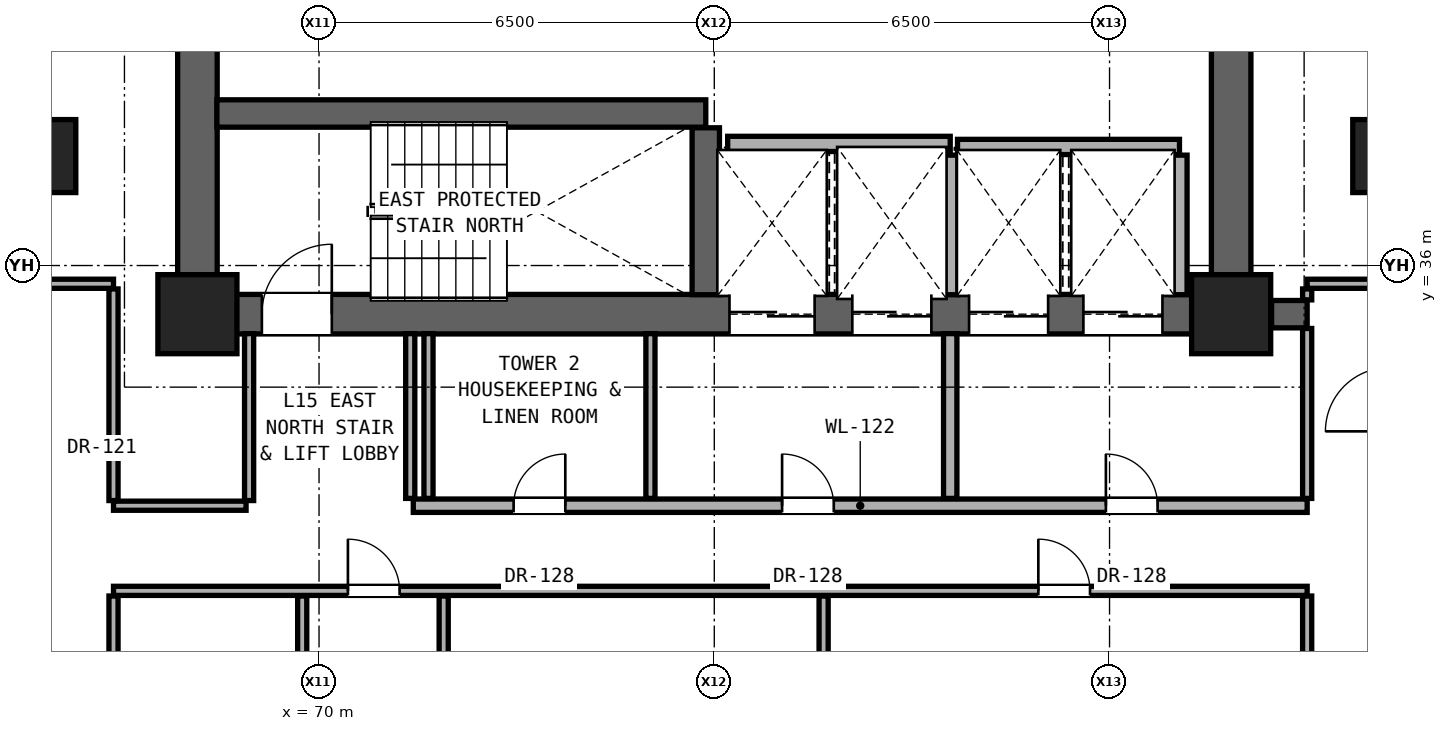
"""IFC4 building model, lengths in metres.
Left out: names, types, materials, properties, quantities, classifications, styles, units other than length and angle.
Written with IfcOpenShell. Run it as: python <this file> out.ifc"""

import sys

from ifc_helpers import new_model, si_unit, direction, frame, frame_2d, origin, origin_2d, place, context, subcontext, project, spatial, rectangle, extrude, element, fill, save


model = new_model("IFC4")
c1 = context("Model", 3, precision=1e-05, world=origin(), true_north=direction((0.0, 1.0)))
c2 = subcontext(c1, "Body", "Model", "MODEL_VIEW")
j1 = project(units=[si_unit("LENGTHUNIT", "METRE"), si_unit("PLANEANGLEUNIT", "RADIAN")], contexts=[c1])
p1 = place(None, origin())
s1 = spatial("IfcSite", under=j1, at=p1, CompositionType="ELEMENT")
p2 = place(p1, origin())
s2 = spatial("IfcBuilding", under=s1, at=p2, CompositionType="ELEMENT")
p3 = place(p2, frame((0.0, 0.0, 55.4)))
s3 = spatial("IfcBuildingStorey", under=s2, at=p3, CompositionType="ELEMENT", Elevation=55.4)
for number, where, z_axis, x_axis in (
    (1, (68.0, 35.2, 0.0), (0.0, 0.0, 1.0), (1.0, 0.0, 0.0)),
    (2, (85.0, 35.2, 0.0), (0.0, 0.0, 1.0), (1.0, 0.0, 0.0)),
):
    element("IfcColumn", number, at=place(p3, frame(where, z_axis=z_axis, x_axis=x_axis)), inside=s3, PredefinedType="COLUMN", context=c2, shape_type="SweptSolid", body=[
        extrude(rectangle(XDim=1.3, YDim=1.3, at=origin_2d()), origin(), (0.0, 0.0, 1.0), 3.3),
    ])
for number, where, z_axis, x_axis in (
    (3, (65.6, 37.8, 0.0), (0.0, 0.0, 1.0), (1.0, 0.0, 0.0)),
    (4, (87.4, 37.8, 0.0), (0.0, 0.0, 1.0), (1.0, 0.0, 0.0)),
):
    element("IfcColumn", number, at=place(p3, frame(where, z_axis=z_axis, x_axis=x_axis)), inside=s3, PredefinedType="PILASTER", context=c2, shape_type="SweptSolid", body=[
        extrude(rectangle(XDim=0.8, YDim=1.2, at=origin_2d()), origin(), (0.0, 0.0, 1.0), 3.3),
    ])
for number, where, z_axis, x_axis in (
    (5, (68.0, 35.2, 0.0), (0.0, 0.0, 1.0), (0.0, 1.0, 0.0)),
    (6, (85.0, 35.2, 0.0), (0.0, 0.0, 1.0), (0.0, 1.0, 0.0)),
):
    element("IfcWall", number, at=place(p3, frame(where, z_axis=z_axis, x_axis=x_axis)), inside=s3, PredefinedType="SHEAR", context=c2, shape_type="SweptSolid", body=[
        extrude(rectangle(XDim=5.6, YDim=0.65, at=frame_2d((2.8, 0.0))), origin(), (0.0, 0.0, 1.0), 3.06),
    ])
p4 = place(p3, frame((68.0, 35.2, 0.0), z_axis=(0.0, 0.0, 1.0), x_axis=(1.0, 0.0, 0.0)))
e7 = element("IfcWall", 7, at=p4, inside=s3, PredefinedType="SHEAR", context=c2, shape_type="SweptSolid", body=[
    extrude(rectangle(XDim=17.0, YDim=0.65, at=frame_2d((8.5, 0.0))), origin(), (0.0, 0.0, 1.0), 3.06),
])
p5 = place(p4, frame((1.06, 0.0, 0.0)))
e8 = element("IfcOpeningElement", 8, at=p5, cuts=e7, PredefinedType="OPENING", context=c2, shape_type="SweptSolid", body=[
    extrude(rectangle(XDim=1.15, YDim=2.2, at=frame_2d((0.575, 1.1))), frame((0.0, 0.335, 0.0), z_axis=(0.0, -1.0, 0.0), x_axis=(1.0, 0.0, 0.0)), (0.0, 0.0, 1.0), 0.67),
])
p6 = place(p4, frame((8.75, 0.0, 0.0)))
e9 = element("IfcOpeningElement", 9, at=p6, cuts=e7, PredefinedType="OPENING", context=c2, shape_type="SweptSolid", body=[
    extrude(rectangle(XDim=1.4, YDim=2.35, at=frame_2d((0.7, 1.175))), frame((0.0, 0.335, 0.0), z_axis=(0.0, -1.0, 0.0), x_axis=(1.0, 0.0, 0.0)), (0.0, 0.0, 1.0), 0.67),
])
p7 = place(p4, frame((10.77, 0.0, 0.0)))
e10 = element("IfcOpeningElement", 10, at=p7, cuts=e7, PredefinedType="OPENING", context=c2, shape_type="SweptSolid", body=[
    extrude(rectangle(XDim=1.3, YDim=2.3, at=frame_2d((0.65, 1.15))), frame((0.0, 0.335, 0.0), z_axis=(0.0, -1.0, 0.0), x_axis=(1.0, 0.0, 0.0)), (0.0, 0.0, 1.0), 0.67),
])
p8 = place(p4, frame((12.69, 0.0, 0.0)))
e11 = element("IfcOpeningElement", 11, at=p8, cuts=e7, PredefinedType="OPENING", context=c2, shape_type="SweptSolid", body=[
    extrude(rectangle(XDim=1.3, YDim=2.3, at=frame_2d((0.65, 1.15))), frame((0.0, 0.335, 0.0), z_axis=(0.0, -1.0, 0.0), x_axis=(1.0, 0.0, 0.0)), (0.0, 0.0, 1.0), 0.67),
])
p9 = place(p4, frame((14.57, 0.0, 0.0)))
e12 = element("IfcOpeningElement", 12, at=p9, cuts=e7, PredefinedType="OPENING", context=c2, shape_type="SweptSolid", body=[
    extrude(rectangle(XDim=1.3, YDim=2.3, at=frame_2d((0.65, 1.15))), frame((0.0, 0.335, 0.0), z_axis=(0.0, -1.0, 0.0), x_axis=(1.0, 0.0, 0.0)), (0.0, 0.0, 1.0), 0.67),
])
p10 = place(p3, frame((66.62, 30.65, 0.0), z_axis=(0.0, 0.0, 1.0), x_axis=(1.0, 0.0, 0.0)))
e13 = element("IfcWall", 13, at=p10, inside=s3, PredefinedType="PARTITIONING", context=c2, shape_type="SweptSolid", body=[
    extrude(rectangle(XDim=19.63, YDim=0.15, at=frame_2d((9.815, 0.0))), origin(), (0.0, 0.0, 1.0), 2.125),
])
p11 = place(p10, frame((3.855, 0.0, 0.0)))
e14 = element("IfcOpeningElement", 14, at=p11, cuts=e13, PredefinedType="OPENING", context=c2, shape_type="SweptSolid", body=[
    extrude(rectangle(XDim=0.85, YDim=2.01, at=frame_2d((0.425, 1.005))), frame((0.0, 0.085, 0.0), z_axis=(0.0, -1.0, 0.0), x_axis=(1.0, 0.0, 0.0)), (0.0, 0.0, 1.0), 0.17),
])
p12 = place(p10, frame((15.209, 0.0, 0.0)))
e15 = element("IfcOpeningElement", 15, at=p12, cuts=e13, PredefinedType="OPENING", context=c2, shape_type="SweptSolid", body=[
    extrude(rectangle(XDim=0.85, YDim=2.01, at=frame_2d((0.425, 1.005))), frame((0.0, 0.085, 0.0), z_axis=(0.0, -1.0, 0.0), x_axis=(1.0, 0.0, 0.0)), (0.0, 0.0, 1.0), 0.17),
])
p13 = place(p3, frame((66.62, 32.05, 0.0), z_axis=(0.0, 0.0, 1.0), x_axis=(1.0, 0.0, 0.0)))
e16 = element("IfcWall", 16, at=p13, inside=s3, PredefinedType="PARTITIONING", context=c2, shape_type="SweptSolid", body=[
    extrude(rectangle(XDim=2.18, YDim=0.15, at=frame_2d((1.09, 0.0))), origin(), (0.0, 0.0, 1.0), 2.125),
])
p14 = place(p3, frame((71.55, 32.05, 0.0), z_axis=(0.0, 0.0, 1.0), x_axis=(1.0, 0.0, 0.0)))
e17 = element("IfcWall", 17, at=p14, inside=s3, PredefinedType="SOLIDWALL", context=c2, shape_type="SweptSolid", body=[
    extrude(rectangle(XDim=14.7, YDim=0.22, at=frame_2d((7.35, 0.0))), origin(), (0.0, 0.0, 1.0), 2.125),
])
p15 = place(p14, frame((11.39, 0.0, 0.0)))
e18 = element("IfcOpeningElement", 18, at=p15, cuts=e17, PredefinedType="OPENING", context=c2, shape_type="SweptSolid", body=[
    extrude(rectangle(XDim=0.85, YDim=2.01, at=frame_2d((0.425, 1.005))), frame((0.0, 0.12, 0.0), z_axis=(0.0, -1.0, 0.0), x_axis=(1.0, 0.0, 0.0)), (0.0, 0.0, 1.0), 0.24),
])
p16 = place(p14, frame((6.065, 0.0, 0.0)))
e19 = element("IfcOpeningElement", 19, at=p16, cuts=e17, PredefinedType="OPENING", context=c2, shape_type="SweptSolid", body=[
    extrude(rectangle(XDim=0.85, YDim=2.01, at=frame_2d((0.425, 1.005))), frame((0.0, 0.12, 0.0), z_axis=(0.0, -1.0, 0.0), x_axis=(1.0, 0.0, 0.0)), (0.0, 0.0, 1.0), 0.24),
])
p17 = place(p14, frame((1.65, 0.0, 0.0)))
e20 = element("IfcOpeningElement", 20, at=p17, cuts=e17, PredefinedType="OPENING", context=c2, shape_type="SweptSolid", body=[
    extrude(rectangle(XDim=0.85, YDim=2.01, at=frame_2d((0.425, 1.005))), frame((0.0, 0.12, 0.0), z_axis=(0.0, -1.0, 0.0), x_axis=(1.0, 0.0, 0.0)), (0.0, 0.0, 1.0), 0.24),
])
p18 = place(p3, frame((85.665, 35.2, 0.0), z_axis=(0.0, 0.0, 1.0), x_axis=(1.0, 0.0, 0.0)))
e21 = element("IfcWall", 21, at=p18, inside=s3, PredefinedType="SHEAR", context=c2, shape_type="SweptSolid", body=[
    extrude(rectangle(XDim=0.585, YDim=0.45, at=frame_2d((0.292, 0.0))), origin(), (0.0, 0.0, 1.0), 3.06),
])
p19 = place(p3, frame((65.25, 35.7, 0.0), z_axis=(0.0, 0.0, 1.0), x_axis=(1.0, 0.0, 0.0)))
e22 = element("IfcWall", 22, at=p19, inside=s3, PredefinedType="PARTITIONING", context=c2, shape_type="SweptSolid", body=[
    extrude(rectangle(XDim=1.37, YDim=0.15, at=frame_2d((0.685, 0.0))), origin(), (0.0, 0.0, 1.0), 3.06),
])
p20 = place(p3, frame((86.25, 35.7, 0.0), z_axis=(0.0, 0.0, 1.0), x_axis=(1.0, 0.0, 0.0)))
e23 = element("IfcWall", 23, at=p20, inside=s3, PredefinedType="PARTITIONING", context=c2, shape_type="SweptSolid", body=[
    extrude(rectangle(XDim=1.35, YDim=0.15, at=frame_2d((0.675, 0.0))), origin(), (0.0, 0.0, 1.0), 3.06),
])
p21 = place(p3, frame((80.5, 37.95, 0.0), z_axis=(0.0, 0.0, 1.0), x_axis=(1.0, 0.0, 0.0)))
e24 = element("IfcWall", 24, at=p21, inside=s3, PredefinedType="SOLIDWALL", context=c2, shape_type="SweptSolid", body=[
    extrude(rectangle(XDim=3.65, YDim=0.25, at=frame_2d((1.825, 0.0))), origin(), (0.0, 0.0, 1.0), 3.06),
])
p22 = place(p3, frame((76.72, 38.0, 0.0), z_axis=(0.0, 0.0, 1.0), x_axis=(1.0, 0.0, 0.0)))
e25 = element("IfcWall", 25, at=p22, inside=s3, PredefinedType="SOLIDWALL", context=c2, shape_type="SweptSolid", body=[
    extrude(rectangle(XDim=3.66, YDim=0.25, at=frame_2d((1.83, 0.0))), origin(), (0.0, 0.0, 1.0), 3.06),
])
p23 = place(p3, frame((68.32, 38.5, 0.0), z_axis=(0.0, 0.0, 1.0), x_axis=(1.0, 0.0, 0.0)))
e26 = element("IfcWall", 26, at=p23, inside=s3, PredefinedType="SHEAR", context=c2, shape_type="SweptSolid", body=[
    extrude(rectangle(XDim=8.04, YDim=0.45, at=frame_2d((4.02, 0.0))), origin(), (0.0, 0.0, 1.0), 3.06),
])
p24 = place(p3, frame((66.62, 24.935, 0.0), z_axis=(0.0, 0.0, 1.0), x_axis=(0.0, 1.0, 0.0)))
e27 = element("IfcWall", 27, at=p24, inside=s3, PredefinedType="PARTITIONING", context=c2, shape_type="SweptSolid", body=[
    extrude(rectangle(XDim=5.63, YDim=0.15, at=frame_2d((2.815, 0.0))), origin(), (0.0, 0.0, 1.0), 2.279),
])
p25 = place(p24, frame((2.34, 0.0, 0.0)))
e28 = element("IfcOpeningElement", 28, at=p25, cuts=e27, PredefinedType="OPENING", context=c2, shape_type="SweptSolid", body=[
    extrude(rectangle(XDim=0.95, YDim=2.15, at=frame_2d((0.475, 1.075))), frame((0.0, 0.085, 0.0), z_axis=(0.0, -1.0, 0.0), x_axis=(1.0, 0.0, 0.0)), (0.0, 0.0, 1.0), 0.17),
])
p26 = place(p3, frame((66.62, 32.135, 0.0), z_axis=(0.0, 0.0, 1.0), x_axis=(0.0, 1.0, 0.0)))
e29 = element("IfcWall", 29, at=p26, inside=s3, PredefinedType="PARTITIONING", context=c2, shape_type="SweptSolid", body=[
    extrude(rectangle(XDim=3.48, YDim=0.15, at=frame_2d((1.74, 0.0))), origin(), (0.0, 0.0, 1.0), 2.452),
])
p27 = place(p3, frame((68.85, 32.135, 0.0), z_axis=(0.0, 0.0, 1.0), x_axis=(0.0, 1.0, 0.0)))
e30 = element("IfcWall", 30, at=p27, inside=s3, PredefinedType="PARTITIONING", context=c2, shape_type="SweptSolid", body=[
    extrude(rectangle(XDim=2.745, YDim=0.15, at=frame_2d((1.373, 0.0))), origin(), (0.0, 0.0, 1.0), 3.06),
])
p28 = place(p3, frame((69.723, 24.935, 0.0), z_axis=(0.0, 0.0, 1.0), x_axis=(0.0, 1.0, 0.0)))
e31 = element("IfcWall", 31, at=p28, inside=s3, PredefinedType="PARTITIONING", context=c2, shape_type="SweptSolid", body=[
    extrude(rectangle(XDim=5.63, YDim=0.15, at=frame_2d((2.815, 0.0))), origin(), (0.0, 0.0, 1.0), 2.125),
])
for number, where, z_axis, x_axis in (
    (32, (71.5, 32.17, 0.0), (0.0, 0.0, 1.0), (0.0, 1.0, 0.0)),
    (33, (71.8, 32.17, 0.0), (0.0, 0.0, 1.0), (0.0, 1.0, 0.0)),
):
    element("IfcWall", number, at=place(p3, frame(where, z_axis=z_axis, x_axis=x_axis)), inside=s3, PredefinedType="PARTITIONING", context=c2, shape_type="SweptSolid", body=[
        extrude(rectangle(XDim=2.71, YDim=0.15, at=frame_2d((1.355, 0.0))), origin(), (0.0, 0.0, 1.0), 3.06),
    ])
p29 = place(p3, frame((72.05, 22.435, 0.0), z_axis=(0.0, 0.0, 1.0), x_axis=(0.0, 1.0, 0.0)))
e34 = element("IfcWall", 34, at=p29, inside=s3, PredefinedType="PARTITIONING", context=c2, shape_type="SweptSolid", body=[
    extrude(rectangle(XDim=8.13, YDim=0.15, at=frame_2d((4.065, 0.0))), origin(), (0.0, 0.0, 1.0), 2.125),
])
p30 = place(p3, frame((75.45, 32.17, 0.0), z_axis=(0.0, 0.0, 1.0), x_axis=(0.0, 1.0, 0.0)))
e35 = element("IfcWall", 35, at=p30, inside=s3, PredefinedType="PARTITIONING", context=c2, shape_type="SweptSolid", body=[
    extrude(rectangle(XDim=2.71, YDim=0.15, at=frame_2d((1.355, 0.0))), origin(), (0.0, 0.0, 1.0), 3.06),
])
p31 = place(p3, frame((76.36, 35.52, 0.0), z_axis=(0.0, 0.0, 1.0), x_axis=(0.0, 1.0, 0.0)))
e36 = element("IfcWall", 36, at=p31, inside=s3, PredefinedType="SHEAR", context=c2, shape_type="SweptSolid", body=[
    extrude(rectangle(XDim=2.745, YDim=0.45, at=frame_2d((1.373, 0.0))), origin(), (0.0, 0.0, 1.0), 3.06),
])
p32 = place(p3, frame((78.298, 22.435, 0.0), z_axis=(0.0, 0.0, 1.0), x_axis=(0.0, 1.0, 0.0)))
e37 = element("IfcWall", 37, at=p32, inside=s3, PredefinedType="PARTITIONING", context=c2, shape_type="SweptSolid", body=[
    extrude(rectangle(XDim=8.13, YDim=0.15, at=frame_2d((4.065, 0.0))), origin(), (0.0, 0.0, 1.0), 2.125),
])
p33 = place(p3, frame((80.38, 32.17, 0.0), z_axis=(0.0, 0.0, 1.0), x_axis=(0.0, 1.0, 0.0)))
e38 = element("IfcWall", 38, at=p33, inside=s3, PredefinedType="SOLIDWALL", context=c2, shape_type="SweptSolid", body=[
    extrude(rectangle(XDim=2.71, YDim=0.22, at=frame_2d((1.355, 0.0))), origin(), (0.0, 0.0, 1.0), 3.06),
])
for number, where, z_axis, x_axis in (
    (39, (80.38, 35.52, 0.0), (0.0, 0.0, 1.0), (0.0, 1.0, 0.0)),
    (40, (84.15, 35.52, 0.0), (0.0, 0.0, 1.0), (0.0, 1.0, 0.0)),
):
    element("IfcWall", number, at=place(p3, frame(where, z_axis=z_axis, x_axis=x_axis)), inside=s3, PredefinedType="SOLIDWALL", context=c2, shape_type="SweptSolid", body=[
        extrude(rectangle(XDim=2.295, YDim=0.25, at=frame_2d((1.147, 0.0))), origin(), (0.0, 0.0, 1.0), 3.06),
    ])
p34 = place(p3, frame((86.25, 22.435, 0.0), z_axis=(0.0, 0.0, 1.0), x_axis=(0.0, 1.0, 0.0)))
e41 = element("IfcWall", 41, at=p34, inside=s3, PredefinedType="PARTITIONING", context=c2, shape_type="SweptSolid", body=[
    extrude(rectangle(XDim=8.13, YDim=0.15, at=frame_2d((4.065, 0.0))), origin(), (0.0, 0.0, 1.0), 2.279),
])
p35 = place(p3, frame((86.25, 32.17, 0.0), z_axis=(0.0, 0.0, 1.0), x_axis=(0.0, 1.0, 0.0)))
e42 = element("IfcWall", 42, at=p35, inside=s3, PredefinedType="PARTITIONING", context=c2, shape_type="SweptSolid", body=[
    extrude(rectangle(XDim=2.795, YDim=0.15, at=frame_2d((1.397, 0.0))), origin(), (0.0, 0.0, 1.0), 2.452),
])
p36 = place(p3, frame((86.25, 35.435, 0.0), z_axis=(0.0, 0.0, 1.0), x_axis=(0.0, 1.0, 0.0)))
e43 = element("IfcWall", 43, at=p36, inside=s3, PredefinedType="PARTITIONING", context=c2, shape_type="SweptSolid", body=[
    extrude(rectangle(XDim=0.18, YDim=0.15, at=frame_2d((0.09, 0.0))), origin(), (0.0, 0.0, 1.0), 2.452),
])
p37 = place(p15, origin())
e44 = element("IfcDoor", 44, at=p37, inside=s3, OperationType="SINGLE_SWING_LEFT", PredefinedType="DOOR", context=c2, shape_type="SweptSolid", body=[
    extrude(rectangle(XDim=0.85, YDim=2.01, at=frame_2d((0.425, 1.005))), frame((0.0, 0.025, 0.0), z_axis=(0.0, -1.0, 0.0), x_axis=(1.0, 0.0, 0.0)), (0.0, 0.0, 1.0), 0.05),
])
fill(e18, e44)
p38 = place(p5, origin())
e45 = element("IfcDoor", 45, at=p38, inside=s3, OperationType="SINGLE_SWING_RIGHT", PredefinedType="DOOR", context=c2, shape_type="SweptSolid", body=[
    extrude(rectangle(XDim=1.15, YDim=2.2, at=frame_2d((0.575, 1.1))), frame((0.0, 0.025, 0.0), z_axis=(0.0, -1.0, 0.0), x_axis=(1.0, 0.0, 0.0)), (0.0, 0.0, 1.0), 0.05),
])
fill(e8, e45)
p39 = place(p16, origin())
e46 = element("IfcDoor", 46, at=p39, inside=s3, OperationType="SINGLE_SWING_LEFT", PredefinedType="DOOR", context=c2, shape_type="SweptSolid", body=[
    extrude(rectangle(XDim=0.85, YDim=2.01, at=frame_2d((0.425, 1.005))), frame((0.0, 0.025, 0.0), z_axis=(0.0, -1.0, 0.0), x_axis=(1.0, 0.0, 0.0)), (0.0, 0.0, 1.0), 0.05),
])
fill(e19, e46)
p40 = place(p17, origin())
e47 = element("IfcDoor", 47, at=p40, inside=s3, OperationType="SINGLE_SWING_RIGHT", PredefinedType="DOOR", context=c2, shape_type="SweptSolid", body=[
    extrude(rectangle(XDim=0.85, YDim=2.01, at=frame_2d((0.425, 1.005))), frame((0.0, 0.025, 0.0), z_axis=(0.0, -1.0, 0.0), x_axis=(1.0, 0.0, 0.0)), (0.0, 0.0, 1.0), 0.05),
])
fill(e20, e47)
p41 = place(p11, origin())
e48 = element("IfcDoor", 48, at=p41, inside=s3, OperationType="SINGLE_SWING_LEFT", PredefinedType="DOOR", context=c2, shape_type="SweptSolid", body=[
    extrude(rectangle(XDim=0.85, YDim=2.01, at=frame_2d((0.425, 1.005))), frame((0.0, 0.025, 0.0), z_axis=(0.0, -1.0, 0.0), x_axis=(1.0, 0.0, 0.0)), (0.0, 0.0, 1.0), 0.05),
])
fill(e14, e48)
p42 = place(p12, origin())
e49 = element("IfcDoor", 49, at=p42, inside=s3, OperationType="SINGLE_SWING_LEFT", PredefinedType="DOOR", context=c2, shape_type="SweptSolid", body=[
    extrude(rectangle(XDim=0.85, YDim=2.01, at=frame_2d((0.425, 1.005))), frame((0.0, 0.025, 0.0), z_axis=(0.0, -1.0, 0.0), x_axis=(1.0, 0.0, 0.0)), (0.0, 0.0, 1.0), 0.05),
])
fill(e15, e49)
p43 = place(p6, origin())
e50 = element("IfcDoor", 50, at=p43, inside=s3, OperationType="DOUBLE_DOOR_SLIDING", PredefinedType="DOOR", context=c2, shape_type="SweptSolid", body=[
    extrude(rectangle(XDim=1.4, YDim=2.35, at=frame_2d((0.7, 1.175))), frame((0.0, 0.025, 0.0), z_axis=(0.0, -1.0, 0.0), x_axis=(1.0, 0.0, 0.0)), (0.0, 0.0, 1.0), 0.05),
])
fill(e9, e50)
p44 = place(p7, origin())
e51 = element("IfcDoor", 51, at=p44, inside=s3, OperationType="DOUBLE_DOOR_SLIDING", PredefinedType="DOOR", context=c2, shape_type="SweptSolid", body=[
    extrude(rectangle(XDim=1.3, YDim=2.3, at=frame_2d((0.65, 1.15))), frame((0.0, 0.025, 0.0), z_axis=(0.0, -1.0, 0.0), x_axis=(1.0, 0.0, 0.0)), (0.0, 0.0, 1.0), 0.05),
])
fill(e10, e51)
p45 = place(p8, origin())
e52 = element("IfcDoor", 52, at=p45, inside=s3, OperationType="DOUBLE_DOOR_SLIDING", PredefinedType="DOOR", context=c2, shape_type="SweptSolid", body=[
    extrude(rectangle(XDim=1.3, YDim=2.3, at=frame_2d((0.65, 1.15))), frame((0.0, 0.025, 0.0), z_axis=(0.0, -1.0, 0.0), x_axis=(1.0, 0.0, 0.0)), (0.0, 0.0, 1.0), 0.05),
])
fill(e11, e52)
p46 = place(p9, origin())
e53 = element("IfcDoor", 53, at=p46, inside=s3, OperationType="DOUBLE_DOOR_SLIDING", PredefinedType="DOOR", context=c2, shape_type="SweptSolid", body=[
    extrude(rectangle(XDim=1.3, YDim=2.3, at=frame_2d((0.65, 1.15))), frame((0.0, 0.025, 0.0), z_axis=(0.0, -1.0, 0.0), x_axis=(1.0, 0.0, 0.0)), (0.0, 0.0, 1.0), 0.05),
])
fill(e12, e53)
save(model, sys.argv[1])
